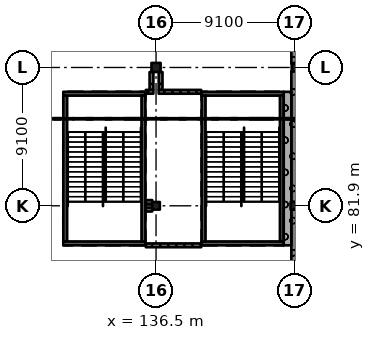
"""IFC4 building model, lengths in metres.
Left out: names, types, materials, properties, quantities, classifications, styles, units other than length and angle.
Written with IfcOpenShell. Run it as: python <this file> out.ifc"""

import sys

from ifc_helpers import new_model, si_unit, direction, frame, frame_2d, origin, origin_2d, place, context, subcontext, project, spatial, rectangle, extrude, element, fill, save


model = new_model("IFC4")
c1 = context("Model", 3, precision=1e-05, world=origin(), true_north=direction((0.0, 1.0)))
c2 = subcontext(c1, "Body", "Model", "MODEL_VIEW")
j1 = project(units=[si_unit("LENGTHUNIT", "METRE"), si_unit("PLANEANGLEUNIT", "RADIAN")], contexts=[c1])
p1 = place(None, origin())
s1 = spatial("IfcSite", under=j1, at=p1, CompositionType="ELEMENT")
p2 = place(p1, origin())
s2 = spatial("IfcBuilding", under=s1, at=p2, CompositionType="ELEMENT")
p3 = place(p2, frame((0.0, 0.0, 20.02)))
s3 = spatial("IfcBuildingStorey", under=s2, at=p3, CompositionType="ELEMENT", Elevation=20.02)
p4 = place(p3, frame((136.5, 81.9, 0.0), z_axis=(0.0, 0.0, 1.0), x_axis=(1.0, 0.0, 0.0)))
e1 = element("IfcColumn", 1, at=p4, inside=s3, PredefinedType="COLUMN", context=c2, shape_type="SweptSolid", body=[
    extrude(rectangle(XDim=0.5, YDim=0.5, at=origin_2d()), origin(), (0.0, 0.0, 1.0), 4.55),
])
p5 = place(p3, frame((136.5, 91.0, 0.0), z_axis=(0.0, 0.0, 1.0), x_axis=(1.0, 0.0, 0.0)))
e2 = element("IfcColumn", 2, at=p5, inside=s3, PredefinedType="COLUMN", context=c2, shape_type="SweptSolid", body=[
    extrude(rectangle(XDim=0.6, YDim=0.6, at=origin_2d()), origin(), (0.0, 0.0, 1.0), 4.55),
])
for number, where, z_axis, x_axis in (
    (3, (145.6, 81.9, 0.0), (0.0, 0.0, 1.0), (1.0, 0.0, 0.0)),
    (4, (145.675, 91.0, 0.0), (0.0, 0.0, 1.0), (1.0, 0.0, 0.0)),
):
    element("IfcColumn", number, at=place(p3, frame(where, z_axis=z_axis, x_axis=x_axis)), inside=s3, PredefinedType="COLUMN", context=c2, shape_type="SweptSolid", body=[
        extrude(rectangle(XDim=0.5, YDim=0.5, at=origin_2d()), origin(), (0.0, 0.0, 1.0), 4.55),
    ])
p6 = place(p3, frame((144.9, 79.425, 0.0), z_axis=(0.0, 0.0, 1.0), x_axis=(-1.0, 0.0, 0.0)))
e5 = element("IfcWall", 5, at=p6, inside=s3, PredefinedType="SHEAR", context=c2, shape_type="SweptSolid", body=[
    extrude(rectangle(XDim=5.4, YDim=0.25, at=frame_2d((2.7, 0.0))), origin(), (0.0, 0.0, 1.0), 4.55),
])
p7 = place(p3, frame((144.9, 89.275, 0.0), z_axis=(0.0, 0.0, 1.0), x_axis=(-1.0, 0.0, 0.0)))
e6 = element("IfcWall", 6, at=p7, inside=s3, PredefinedType="SHEAR", context=c2, shape_type="SweptSolid", body=[
    extrude(rectangle(XDim=5.4, YDim=0.25, at=frame_2d((2.7, 0.0))), origin(), (0.0, 0.0, 1.0), 4.55),
])
p8 = place(p7, frame((1.5, 0.0, 0.0)))
e7 = element("IfcOpeningElement", 7, at=p8, cuts=e6, PredefinedType="OPENING", context=c2, shape_type="SweptSolid", body=[
    extrude(rectangle(XDim=2.4, YDim=2.1, at=frame_2d((1.2, 1.05))), frame((0.0, 0.135, 0.0), z_axis=(0.0, -1.0, 0.0), x_axis=(1.0, 0.0, 0.0)), (0.0, 0.0, 1.0), 0.27),
])
for number, where, z_axis, x_axis in (
    (8, (139.625, 89.15, 0.0), (0.0, 0.0, 1.0), (0.0, -1.0, 0.0)),
    (9, (144.775, 89.15, 0.0), (0.0, 0.0, 1.0), (0.0, -1.0, 0.0)),
):
    element("IfcWall", number, at=place(p3, frame(where, z_axis=z_axis, x_axis=x_axis)), inside=s3, PredefinedType="SHEAR", context=c2, shape_type="SweptSolid", body=[
        extrude(rectangle(XDim=9.6, YDim=0.25, at=frame_2d((4.8, 0.0))), origin(), (0.0, 0.0, 1.0), 4.55),
    ])
p9 = place(p3, frame((135.8, 79.425, 0.0), z_axis=(0.0, 0.0, 1.0), x_axis=(-1.0, 0.0, 0.0)))
e10 = element("IfcWall", 10, at=p9, inside=s3, PredefinedType="SHEAR", context=c2, shape_type="SweptSolid", body=[
    extrude(rectangle(XDim=5.4, YDim=0.25, at=frame_2d((2.7, 0.0))), origin(), (0.0, 0.0, 1.0), 4.55),
])
p10 = place(p3, frame((135.8, 89.275, 0.0), z_axis=(0.0, 0.0, 1.0), x_axis=(-1.0, 0.0, 0.0)))
e11 = element("IfcWall", 11, at=p10, inside=s3, PredefinedType="SHEAR", context=c2, shape_type="SweptSolid", body=[
    extrude(rectangle(XDim=5.4, YDim=0.25, at=frame_2d((2.7, 0.0))), origin(), (0.0, 0.0, 1.0), 4.55),
])
p11 = place(p10, frame((1.5, 0.0, 0.0)))
e12 = element("IfcOpeningElement", 12, at=p11, cuts=e11, PredefinedType="OPENING", context=c2, shape_type="SweptSolid", body=[
    extrude(rectangle(XDim=2.4, YDim=2.1, at=frame_2d((1.2, 1.05))), frame((0.0, 0.135, 0.0), z_axis=(0.0, -1.0, 0.0), x_axis=(1.0, 0.0, 0.0)), (0.0, 0.0, 1.0), 0.27),
])
for number, where, z_axis, x_axis in (
    (13, (130.525, 89.15, 0.0), (0.0, 0.0, 1.0), (0.0, -1.0, 0.0)),
    (14, (135.675, 89.15, 0.0), (0.0, 0.0, 1.0), (0.0, -1.0, 0.0)),
):
    element("IfcWall", number, at=place(p3, frame(where, z_axis=z_axis, x_axis=x_axis)), inside=s3, PredefinedType="SHEAR", context=c2, shape_type="SweptSolid", body=[
        extrude(rectangle(XDim=9.6, YDim=0.25, at=frame_2d((4.8, 0.0))), origin(), (0.0, 0.0, 1.0), 4.55),
    ])
p12 = place(p3, frame((145.575, 73.05, 0.0), z_axis=(0.0, 0.0, 1.0), x_axis=(0.0, 1.0, 0.0)))
e15 = element("IfcWall", 15, at=p12, inside=s3, PredefinedType="SOLIDWALL", context=c2, shape_type="SweptSolid", body=[
    extrude(rectangle(XDim=8.6, YDim=0.35, at=frame_2d((4.3, 0.0))), origin(), (0.0, 0.0, 1.0), 3.5),
])
for number, where, z_axis, x_axis in (
    (16, (145.575, 82.15, 0.0), (0.0, 0.0, 1.0), (0.0, 1.0, 0.0)),
    (17, (145.575, 91.25, 0.0), (0.0, 0.0, 1.0), (0.0, 1.0, 0.0)),
):
    element("IfcWall", number, at=place(p3, frame(where, z_axis=z_axis, x_axis=x_axis)), inside=s3, PredefinedType="SOLIDWALL", context=c2, shape_type="SweptSolid", body=[
        extrude(rectangle(XDim=8.6, YDim=0.35, at=frame_2d((4.3, 0.0))), origin(), (0.0, 0.0, 1.0), 3.5),
    ])
p13 = place(p3, frame((145.15, 79.3, 0.0), z_axis=(0.0, 0.0, 1.0), x_axis=(0.0, 1.0, 0.0)))
e18 = element("IfcWall", 18, at=p13, inside=s3, PredefinedType="SOLIDWALL", context=c2, shape_type="SweptSolid", body=[
    extrude(rectangle(XDim=10.1, YDim=0.5, at=frame_2d((5.05, 0.0))), origin(), (0.0, 0.0, 1.0), 4.55),
])
p14 = place(p3, frame((135.83, 81.65, 0.0), z_axis=(0.0, 0.0, 1.0), x_axis=(1.0, 0.0, 0.0)))
e19 = element("IfcWall", 19, at=p14, inside=s3, PredefinedType="SOLIDWALL", context=c2, shape_type="SweptSolid", body=[
    extrude(rectangle(XDim=0.42, YDim=0.25, at=frame_2d((0.21, 0.0))), origin(), (0.0, 0.0, 1.0), 4.25),
])
p15 = place(p3, frame((136.2, 90.7, 0.0), z_axis=(0.0, 0.0, 1.0), x_axis=(0.0, -1.0, 0.0)))
e20 = element("IfcWall", 20, at=p15, inside=s3, PredefinedType="SOLIDWALL", context=c2, shape_type="SweptSolid", body=[
    extrude(rectangle(XDim=1.175, YDim=0.25, at=frame_2d((0.587, 0.0))), origin(), (0.0, 0.0, 1.0), 4.25),
])
p16 = place(p3, frame((136.25, 82.15, 0.0), z_axis=(0.0, 0.0, 1.0), x_axis=(-1.0, 0.0, 0.0)))
e21 = element("IfcWall", 21, at=p16, inside=s3, PredefinedType="SOLIDWALL", context=c2, shape_type="SweptSolid", body=[
    extrude(rectangle(XDim=0.42, YDim=0.25, at=frame_2d((0.21, 0.0))), origin(), (0.0, 0.0, 1.0), 4.25),
])
p17 = place(p3, frame((136.325, 89.4, 0.0), z_axis=(0.0, 0.0, 1.0), x_axis=(-1.0, 0.0, 0.0)))
e22 = element("IfcWall", 22, at=p17, inside=s3, PredefinedType="SOLIDWALL", context=c2, shape_type="SweptSolid", body=[
    extrude(rectangle(XDim=0.495, YDim=0.25, at=frame_2d((0.248, 0.0))), origin(), (0.0, 0.0, 1.0), 4.25),
])
p18 = place(p3, frame((136.8, 89.525, 0.0), z_axis=(0.0, 0.0, 1.0), x_axis=(0.0, 1.0, 0.0)))
e23 = element("IfcWall", 23, at=p18, inside=s3, PredefinedType="SOLIDWALL", context=c2, shape_type="SweptSolid", body=[
    extrude(rectangle(XDim=1.175, YDim=0.25, at=frame_2d((0.587, 0.0))), origin(), (0.0, 0.0, 1.0), 4.25),
])
p19 = place(p3, frame((139.47, 79.3, 0.0), z_axis=(0.0, 0.0, 1.0), x_axis=(-1.0, 0.0, 0.0)))
e24 = element("IfcWall", 24, at=p19, inside=s3, PredefinedType="SOLIDWALL", context=c2, shape_type="SweptSolid", body=[
    extrude(rectangle(XDim=3.64, YDim=0.25, at=frame_2d((1.82, 0.0))), origin(), (0.0, 0.0, 1.0), 4.25),
])
p20 = place(p3, frame((139.47, 89.4, 0.0), z_axis=(0.0, 0.0, 1.0), x_axis=(-1.0, 0.0, 0.0)))
e25 = element("IfcWall", 25, at=p20, inside=s3, PredefinedType="SOLIDWALL", context=c2, shape_type="SweptSolid", body=[
    extrude(rectangle(XDim=2.795, YDim=0.25, at=frame_2d((1.397, 0.0))), origin(), (0.0, 0.0, 1.0), 4.25),
])
p21 = place(p20, frame((0.85, 0.0, 0.0)))
e26 = element("IfcOpeningElement", 26, at=p21, cuts=e25, PredefinedType="OPENING", context=c2, shape_type="SweptSolid", body=[
    extrude(rectangle(XDim=1.0, YDim=2.1, at=frame_2d((0.5, 1.05))), frame((0.0, 0.135, 0.0), z_axis=(0.0, -1.0, 0.0), x_axis=(1.0, 0.0, 0.0)), (0.0, 0.0, 1.0), 0.27),
])
p22 = place(p21, origin())
e27 = element("IfcDoor", 27, at=p22, inside=s3, OperationType="SINGLE_SWING_RIGHT", PredefinedType="DOOR", context=c2, shape_type="SweptSolid", body=[
    extrude(rectangle(XDim=1.0, YDim=2.1, at=frame_2d((0.5, 1.05))), frame((0.0, 0.025, 0.0), z_axis=(0.0, -1.0, 0.0), x_axis=(1.0, 0.0, 0.0)), (0.0, 0.0, 1.0), 0.05),
])
fill(e26, e27)
p23 = place(p8, origin())
e28 = element("IfcDoor", 28, at=p23, inside=s3, OperationType="DOUBLE_DOOR_SINGLE_SWING", PredefinedType="DOOR", context=c2, shape_type="SweptSolid", body=[
    extrude(rectangle(XDim=2.4, YDim=2.1, at=frame_2d((1.2, 1.05))), frame((0.0, 0.025, 0.0), z_axis=(0.0, -1.0, 0.0), x_axis=(1.0, 0.0, 0.0)), (0.0, 0.0, 1.0), 0.05),
])
fill(e7, e28)
p24 = place(p11, origin())
e29 = element("IfcDoor", 29, at=p24, inside=s3, OperationType="DOUBLE_DOOR_SINGLE_SWING", PredefinedType="DOOR", context=c2, shape_type="SweptSolid", body=[
    extrude(rectangle(XDim=2.4, YDim=2.1, at=frame_2d((1.2, 1.05))), frame((0.0, 0.025, 0.0), z_axis=(0.0, -1.0, 0.0), x_axis=(1.0, 0.0, 0.0)), (0.0, 0.0, 1.0), 0.05),
])
fill(e12, e29)
save(model, sys.argv[1])
